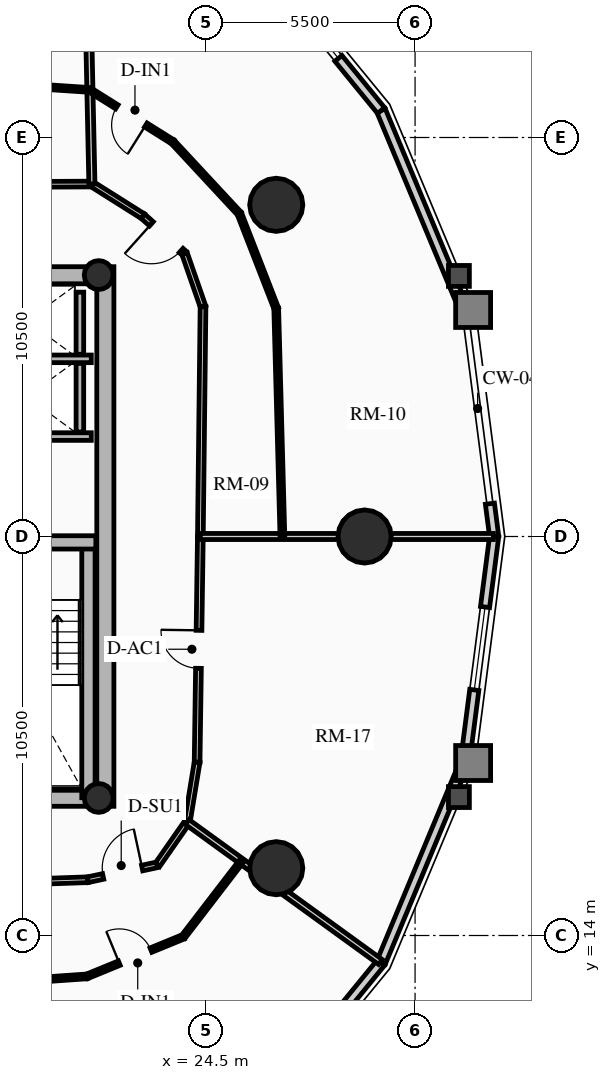
"""IFC4 building model, lengths in metres.
Left out: names, types, materials, properties, quantities, classifications, styles, units other than length and angle.
Written with IfcOpenShell. Run it as: python <this file> out.ifc"""

import sys

from ifc_helpers import new_model, si_unit, direction, frame, frame_2d, origin, origin_2d, place, context, subcontext, project, spatial, rectangle, circle, hollow_circle, extrude, source, transform, mapped, element, fill, save


model = new_model("IFC4")
c1 = context("Model", 3, precision=1e-05, world=origin(), true_north=direction((0.0, 1.0)))
c2 = subcontext(c1, "Body", "Model", "MODEL_VIEW")
j1 = project(units=[si_unit("LENGTHUNIT", "METRE"), si_unit("PLANEANGLEUNIT", "RADIAN")], contexts=[c1])
p1 = place(None, origin())
s1 = spatial("IfcSite", under=j1, at=p1, CompositionType="ELEMENT")
p2 = place(p1, origin())
s2 = spatial("IfcBuilding", under=s1, at=p2, CompositionType="ELEMENT")
p3 = place(p2, frame((0.0, 0.0, 93.43)))
s3 = spatial("IfcBuildingStorey", under=s2, at=p3, CompositionType="ELEMENT", Elevation=93.43)
p4 = place(p3, frame((21.85, 17.4, 0.0), z_axis=(0.0, 0.0, 1.0), x_axis=(0.0, 1.0, 0.0)))
e1 = element("IfcWall", 1, at=p4, inside=s3, PredefinedType="SHEAR", context=c2, shape_type="SweptSolid", body=[
    extrude(rectangle(XDim=14.2, YDim=0.45, at=frame_2d((7.1, 0.0))), origin(), (0.0, 0.0, 1.0), 2.91),
])
p5 = place(p3, frame((11.15, 17.625, 0.0), z_axis=(0.0, 0.0, 1.0), x_axis=(1.0, 0.0, 0.0)))
e2 = element("IfcWall", 2, at=p5, inside=s3, PredefinedType="SHEAR", context=c2, shape_type="SweptSolid", body=[
    extrude(rectangle(XDim=10.7, YDim=0.45, at=frame_2d((5.35, 0.0))), origin(), (0.0, 0.0, 1.0), 2.91),
])
m1 = source(origin(), c2, "Body", "SweptSolid", [
    extrude(rectangle(XDim=1.5, YDim=2.02, at=frame_2d((0.75, 1.01))), frame((0.0, 0.235, 0.0), z_axis=(0.0, -1.0, 0.0), x_axis=(1.0, 0.0, 0.0)), (0.0, 0.0, 1.0), 0.47),
])
p6 = place(p5, frame((5.45, 0.0, 0.0)))
e3 = element("IfcOpeningElement", 3, at=p6, cuts=e2, PredefinedType="OPENING", context=c2, shape_type="MappedRepresentation", body=[
    mapped(m1, transform((0.0, 0.0, 0.0), x_axis=(1.0, 0.0, 0.0), y_axis=(0.0, 1.0, 0.0), z_axis=(0.0, 0.0, 1.0), scale=1.0)),
])
p7 = place(p3, frame((11.15, 31.375, 0.0), z_axis=(0.0, 0.0, 1.0), x_axis=(1.0, 0.0, 0.0)))
e4 = element("IfcWall", 4, at=p7, inside=s3, PredefinedType="SHEAR", context=c2, shape_type="SweptSolid", body=[
    extrude(rectangle(XDim=10.7, YDim=0.45, at=frame_2d((5.35, 0.0))), origin(), (0.0, 0.0, 1.0), 2.91),
])
p8 = place(p7, frame((4.6, 0.0, 0.0)))
e5 = element("IfcOpeningElement", 5, at=p8, cuts=e4, PredefinedType="OPENING", context=c2, shape_type="MappedRepresentation", body=[
    mapped(m1, transform((0.0, 0.0, 0.0), x_axis=(1.0, 0.0, 0.0), y_axis=(0.0, 1.0, 0.0), z_axis=(0.0, 0.0, 1.0), scale=1.0)),
])
p9 = place(p3, frame((21.405, 17.625, 0.0), z_axis=(0.0, 0.0, 1.0), x_axis=(0.0, 1.0, 0.0)))
e6 = element("IfcWall", 6, at=p9, inside=s3, PredefinedType="SHEAR", context=c2, shape_type="SweptSolid", body=[
    extrude(rectangle(XDim=6.72, YDim=0.35, at=frame_2d((3.36, 0.0))), origin(), (0.0, 0.0, 1.0), 2.91),
])
p10 = place(p3, frame((18.315, 24.345, 0.0), z_axis=(0.0, 0.0, 1.0), x_axis=(1.0, 0.0, 0.0)))
e7 = element("IfcWall", 7, at=p10, inside=s3, PredefinedType="SHEAR", context=c2, shape_type="SweptSolid", body=[
    extrude(rectangle(XDim=3.285, YDim=0.35, at=frame_2d((1.643, 0.0))), origin(), (0.0, 0.0, 1.0), 2.91),
])
for number, where, z_axis, x_axis in (
    (8, (21.675, 17.62, 0.0), (0.0, 0.0, 1.0), (1.0, 0.0, 0.0)),
    (9, (21.675, 31.38, 0.0), (0.0, 0.0, 1.0), (1.0, 0.0, 0.0)),
):
    element("IfcColumn", number, at=place(p3, frame(where, z_axis=z_axis, x_axis=x_axis)), inside=s3, PredefinedType="COLUMN", context=c2, shape_type="SweptSolid", body=[
        extrude(hollow_circle(Radius=0.38, WallThickness=0.032, at=origin_2d()), origin(), (0.0, 0.0, 1.0), 2.91),
    ])
for number, where, z_axis, x_axis in (
    (10, (28.672, 24.5, 0.0), (0.0, 0.0, 1.0), (1.0, 0.0, 0.0)),
    (11, (26.347, 33.229, 0.0), (0.0, 0.0, 1.0), (1.0, 0.0, 0.0)),
    (12, (26.347, 15.771, 0.0), (0.0, 0.0, 1.0), (1.0, 0.0, 0.0)),
):
    element("IfcColumn", number, at=place(p3, frame(where, z_axis=z_axis, x_axis=x_axis)), inside=s3, PredefinedType="USERDEFINED", context=c2, shape_type="SweptSolid", body=[
        extrude(circle(Radius=0.7, at=origin_2d()), origin(), (0.0, 0.0, 1.0), 2.91),
    ])
p11 = place(p3, frame((31.969, 25.363, 0.0), z_axis=(0.0, 0.0, 1.0), x_axis=(0.128523364007, -0.991706481225, 0.0)))
e13 = element("IfcWall", 13, at=p11, inside=s3, PredefinedType="SOLIDWALL", context=c2, shape_type="SweptSolid", body=[
    extrude(rectangle(XDim=0.87, YDim=0.24, at=frame_2d((0.435, 0.0))), origin(), (0.0, 0.0, 1.0), 2.655),
])
p12 = place(p3, frame((29.105, 35.709, 0.0), z_axis=(0.0, 0.0, 1.0), x_axis=(0.384344417632, -0.923189779317, 0.0)))
e14 = element("IfcWall", 14, at=p12, inside=s3, PredefinedType="SOLIDWALL", context=c2, shape_type="SweptSolid", body=[
    extrude(rectangle(XDim=5.758, YDim=0.24, at=frame_2d((2.879, 0.0))), origin(), (0.0, 0.0, 1.0), 2.179),
])
p13 = place(p3, frame((25.658, 39.928, 0.0), z_axis=(0.0, 0.0, 1.0), x_axis=(0.632700781152, -0.77439635945, 0.0)))
e15 = element("IfcWall", 15, at=p13, inside=s3, PredefinedType="SOLIDWALL", context=c2, shape_type="SweptSolid", body=[
    extrude(rectangle(XDim=5.448, YDim=0.24, at=frame_2d((2.724, 0.0))), origin(), (0.0, 0.0, 1.0), 2.179),
])
m2 = source(origin(), c2, "Body", "SweptSolid", [
    extrude(rectangle(XDim=1.9, YDim=1.35, at=frame_2d((0.95, 0.675))), frame((0.0, 0.13, 0.0), z_axis=(0.0, -1.0, 0.0), x_axis=(1.0, 0.0, 0.0)), (0.0, 0.0, 1.0), 0.26),
])
p14 = place(p13, frame((1.774, 0.0, 0.65)))
e16 = element("IfcOpeningElement", 16, at=p14, cuts=e15, PredefinedType="OPENING", context=c2, shape_type="MappedRepresentation", body=[
    mapped(m2, transform((0.0, 0.0, 0.0), x_axis=(1.0, 0.0, 0.0), y_axis=(0.0, 1.0, 0.0), z_axis=(0.0, 0.0, 1.0), scale=1.0)),
])
p15 = place(p3, frame((29.105, 13.291, 0.0), z_axis=(0.0, 0.0, 1.0), x_axis=(-0.632700781152, -0.77439635945, 0.0)))
e17 = element("IfcWall", 17, at=p15, inside=s3, PredefinedType="SOLIDWALL", context=c2, shape_type="SweptSolid", body=[
    extrude(rectangle(XDim=5.448, YDim=0.24, at=frame_2d((2.724, 0.0))), origin(), (0.0, 0.0, 1.0), 2.179),
])
p16 = place(p15, frame((1.774, 0.0, 0.65)))
e18 = element("IfcOpeningElement", 18, at=p16, cuts=e17, PredefinedType="OPENING", context=c2, shape_type="MappedRepresentation", body=[
    mapped(m2, transform((0.0, 0.0, 0.0), x_axis=(1.0, 0.0, 0.0), y_axis=(0.0, 1.0, 0.0), z_axis=(0.0, 0.0, 1.0), scale=1.0)),
])
p17 = place(p3, frame((31.318, 18.607, 0.0), z_axis=(0.0, 0.0, 1.0), x_axis=(-0.384344417632, -0.923189779317, 0.0)))
e19 = element("IfcWall", 19, at=p17, inside=s3, PredefinedType="SOLIDWALL", context=c2, shape_type="SweptSolid", body=[
    extrude(rectangle(XDim=5.758, YDim=0.24, at=frame_2d((2.879, 0.0))), origin(), (0.0, 0.0, 1.0), 2.179),
])
p18 = place(p3, frame((32.081, 24.5, 0.0), z_axis=(0.0, 0.0, 1.0), x_axis=(-0.128351991996, -0.991728675672, 0.0)))
e20 = element("IfcWall", 20, at=p18, inside=s3, PredefinedType="SOLIDWALL", context=c2, shape_type="SweptSolid", body=[
    extrude(rectangle(XDim=5.942, YDim=0.24, at=frame_2d((2.971, 0.0))), origin(), (0.0, 0.0, 1.0), 2.179),
])
m3 = source(origin(), c2, "Body", "SweptSolid", [
    extrude(rectangle(XDim=2.2, YDim=1.35, at=frame_2d((1.1, 0.675))), frame((0.0, 0.13, 0.0), z_axis=(0.0, -1.0, 0.0), x_axis=(1.0, 0.0, 0.0)), (0.0, 0.0, 1.0), 0.26),
])
p19 = place(p18, frame((1.871, 0.0, 0.65)))
e21 = element("IfcOpeningElement", 21, at=p19, cuts=e20, PredefinedType="OPENING", context=c2, shape_type="MappedRepresentation", body=[
    mapped(m3, transform((0.0, 0.0, 0.0), x_axis=(1.0, 0.0, 0.0), y_axis=(0.0, 1.0, 0.0), z_axis=(0.0, 0.0, 1.0), scale=1.0)),
])
for number, where, z_axis, x_axis in (
    (22, (18.51, 27.13, 0.0), (0.0, 0.0, 1.0), (1.0, 0.0, 0.0)),
    (23, (18.51, 29.175, 0.0), (0.0, 0.0, 1.0), (1.0, 0.0, 0.0)),
):
    element("IfcWall", number, at=place(p3, frame(where, z_axis=z_axis, x_axis=x_axis)), inside=s3, PredefinedType="SHEAR", context=c2, shape_type="SweptSolid", body=[
        extrude(rectangle(XDim=2.97, YDim=0.2, at=frame_2d((1.485, 0.0))), origin(), (0.0, 0.0, 1.0), 2.91),
    ])
p20 = place(p3, frame((21.18, 27.25, 0.0), z_axis=(0.0, 0.0, 1.0), x_axis=(0.0, 1.0, 0.0)))
e24 = element("IfcWall", 24, at=p20, inside=s3, PredefinedType="SHEAR", context=c2, shape_type="SweptSolid", body=[
    extrude(rectangle(XDim=1.805, YDim=0.2, at=frame_2d((0.902, 0.0))), origin(), (0.0, 0.0, 1.0), 2.91),
])
p21 = place(p3, frame((21.18, 29.295, 0.0), z_axis=(0.0, 0.0, 1.0), x_axis=(0.0, 1.0, 0.0)))
e25 = element("IfcWall", 25, at=p21, inside=s3, PredefinedType="SHEAR", context=c2, shape_type="SweptSolid", body=[
    extrude(rectangle(XDim=1.635, YDim=0.2, at=frame_2d((0.817, 0.0))), origin(), (0.0, 0.0, 1.0), 2.91),
])
p22 = place(p3, frame((24.35, 24.5, 0.0), z_axis=(0.0, 0.0, 1.0), x_axis=(0.011582078845, 0.999932925475, 0.0)))
e26 = element("IfcWall", 26, at=p22, inside=s3, PredefinedType="PARTITIONING", context=c2, shape_type="SweptSolid", body=[
    extrude(rectangle(XDim=6.05, YDim=0.15, at=frame_2d((3.025, 0.0))), origin(), (0.0, 0.0, 1.0), 2.225),
])
p23 = place(p3, frame((24.42, 30.549, 0.0), z_axis=(0.0, 0.0, 1.0), x_axis=(-0.329071042252, 0.944305167386, 0.0)))
e27 = element("IfcWall", 27, at=p23, inside=s3, PredefinedType="PARTITIONING", context=c2, shape_type="SweptSolid", body=[
    extrude(rectangle(XDim=1.479, YDim=0.15, at=frame_2d((0.74, 0.0))), origin(), (0.0, 0.0, 1.0), 2.225),
])
p24 = place(p3, frame((23.933, 31.946, 0.0), z_axis=(0.0, 0.0, 1.0), x_axis=(-0.744529651383, 0.667589393423, 0.0)))
e28 = element("IfcWall", 28, at=p24, inside=s3, PredefinedType="PARTITIONING", context=c2, shape_type="SweptSolid", body=[
    extrude(rectangle(XDim=1.472, YDim=0.15, at=frame_2d((0.736, 0.0))), origin(), (0.0, 0.0, 1.0), 2.225),
])
m4 = source(origin(), c2, "Body", "SweptSolid", [
    extrude(rectangle(XDim=1.05, YDim=2.015, at=frame_2d((0.525, 1.007))), frame((0.0, 0.085, 0.0), z_axis=(0.0, -1.0, 0.0), x_axis=(1.0, 0.0, 0.0)), (0.0, 0.0, 1.0), 0.17),
])
p25 = place(p24, frame((0.12, 0.0, 0.0)))
e29 = element("IfcOpeningElement", 29, at=p25, cuts=e28, PredefinedType="OPENING", context=c2, shape_type="MappedRepresentation", body=[
    mapped(m4, transform((0.0, 0.0, 0.0), x_axis=(1.0, 0.0, 0.0), y_axis=(0.0, 1.0, 0.0), z_axis=(0.0, 0.0, 1.0), scale=1.0)),
])
p26 = place(p3, frame((22.837, 32.929, 0.0), z_axis=(0.0, 0.0, 1.0), x_axis=(-0.84581079329, 0.533482991252, 0.0)))
e30 = element("IfcWall", 30, at=p26, inside=s3, PredefinedType="PARTITIONING", context=c2, shape_type="SweptSolid", body=[
    extrude(rectangle(XDim=1.585, YDim=0.15, at=frame_2d((0.792, 0.0))), origin(), (0.0, 0.0, 1.0), 2.225),
])
p27 = place(p3, frame((21.496, 33.775, 0.0), z_axis=(0.0, 0.0, 1.0), x_axis=(-0.999989544737, -0.004572790979, 0.0)))
e31 = element("IfcWall", 31, at=p27, inside=s3, PredefinedType="PARTITIONING", context=c2, shape_type="SweptSolid", body=[
    extrude(rectangle(XDim=3.364, YDim=0.15, at=frame_2d((1.682, 0.0))), origin(), (0.0, 0.0, 1.0), 2.225),
])
p28 = place(p3, frame((14.792, 15.24, 0.0), z_axis=(0.0, 0.0, 1.0), x_axis=(0.999408106202, 0.034401122909, 0.0)))
e32 = element("IfcWall", 32, at=p28, inside=s3, PredefinedType="PARTITIONING", context=c2, shape_type="SweptSolid", body=[
    extrude(rectangle(XDim=6.6, YDim=0.15, at=frame_2d((3.3, 0.0))), origin(), (0.0, 0.0, 1.0), 2.225),
])
p29 = place(p3, frame((21.388, 15.468, 0.0), z_axis=(0.0, 0.0, 1.0), x_axis=(0.977672748596, 0.210133283069, 0.0)))
e33 = element("IfcWall", 33, at=p29, inside=s3, PredefinedType="PARTITIONING", context=c2, shape_type="SweptSolid", body=[
    extrude(rectangle(XDim=1.876, YDim=0.15, at=frame_2d((0.938, 0.0))), origin(), (0.0, 0.0, 1.0), 2.225),
])
p30 = place(p29, frame((0.413, 0.0, 0.0)))
e34 = element("IfcOpeningElement", 34, at=p30, cuts=e33, PredefinedType="OPENING", context=c2, shape_type="MappedRepresentation", body=[
    mapped(m4, transform((0.0, 0.0, 0.0), x_axis=(1.0, 0.0, 0.0), y_axis=(0.0, 1.0, 0.0), z_axis=(0.0, 0.0, 1.0), scale=1.0)),
])
p31 = place(p3, frame((23.222, 15.862, 0.0), z_axis=(0.0, 0.0, 1.0), x_axis=(0.571941738195, 0.820294244836, 0.0)))
e35 = element("IfcWall", 35, at=p31, inside=s3, PredefinedType="PARTITIONING", context=c2, shape_type="SweptSolid", body=[
    extrude(rectangle(XDim=1.369, YDim=0.15, at=frame_2d((0.685, 0.0))), origin(), (0.0, 0.0, 1.0), 2.225),
])
p32 = place(p3, frame((24.006, 16.985, 0.0), z_axis=(0.0, 0.0, 1.0), x_axis=(0.162043475877, 0.986783619608, 0.0)))
e36 = element("IfcWall", 36, at=p32, inside=s3, PredefinedType="PARTITIONING", context=c2, shape_type="SweptSolid", body=[
    extrude(rectangle(XDim=1.597, YDim=0.15, at=frame_2d((0.798, 0.0))), origin(), (0.0, 0.0, 1.0), 2.225),
])
p33 = place(p3, frame((24.264, 18.561, 0.0), z_axis=(0.0, 0.0, 1.0), x_axis=(0.014427504204, 0.999895918145, 0.0)))
e37 = element("IfcWall", 37, at=p33, inside=s3, PredefinedType="PARTITIONING", context=c2, shape_type="SweptSolid", body=[
    extrude(rectangle(XDim=5.94, YDim=0.15, at=frame_2d((2.97, 0.0))), origin(), (0.0, 0.0, 1.0), 2.655),
])
m5 = source(origin(), c2, "Body", "SweptSolid", [
    extrude(rectangle(XDim=1.0, YDim=2.015, at=frame_2d((0.5, 1.007))), frame((0.0, 0.085, 0.0), z_axis=(0.0, -1.0, 0.0), x_axis=(1.0, 0.0, 0.0)), (0.0, 0.0, 1.0), 0.17),
])
p34 = place(p33, frame((2.47, 0.0, 0.0)))
e38 = element("IfcOpeningElement", 38, at=p34, cuts=e37, PredefinedType="OPENING", context=c2, shape_type="MappedRepresentation", body=[
    mapped(m5, transform((0.0, 0.0, 0.0), x_axis=(1.0, 0.0, 0.0), y_axis=(0.0, 1.0, 0.0), z_axis=(0.0, 0.0, 1.0), scale=1.0)),
])
p35 = place(p3, frame((24.35, 24.5, 0.0), z_axis=(0.0, 0.0, 1.0), x_axis=(1.0, 0.0, 0.0)))
e39 = element("IfcWall", 39, at=p35, inside=s3, PredefinedType="PARTITIONING", context=c2, shape_type="SweptSolid", body=[
    extrude(rectangle(XDim=7.711, YDim=0.16, at=frame_2d((3.855, 0.0))), origin(), (0.0, 0.0, 1.0), 2.179),
])
p36 = place(p3, frame((21.496, 33.775, 0.0), z_axis=(0.0, 0.0, 1.0), x_axis=(-0.021226580265, 0.999774690763, 0.0)))
e40 = element("IfcWall", 40, at=p36, inside=s3, PredefinedType="PARTITIONING", context=c2, shape_type="SweptSolid", body=[
    extrude(rectangle(XDim=8.845, YDim=0.16, at=frame_2d((4.422, 0.0))), origin(), (0.0, 0.0, 1.0), 2.179),
])
p37 = place(p3, frame((24.006, 16.985, 0.0), z_axis=(0.0, 0.0, 1.0), x_axis=(0.809849730791, -0.586637378231, 0.0)))
e41 = element("IfcWall", 41, at=p37, inside=s3, PredefinedType="PARTITIONING", context=c2, shape_type="SweptSolid", body=[
    extrude(rectangle(XDim=6.277, YDim=0.16, at=frame_2d((3.139, 0.0))), origin(), (0.0, 0.0, 1.0), 2.179),
])
p38 = place(p3, frame((26.509, 24.5, 0.0), z_axis=(0.0, 0.0, 1.0), x_axis=(-0.027112670792, 0.99963238397, 0.0)))
e42 = element("IfcWall", 42, at=p38, inside=s3, PredefinedType="PARTITIONING", context=c2, shape_type="SweptSolid", body=[
    extrude(rectangle(XDim=6.006, YDim=0.125, at=frame_2d((3.003, 0.0))), origin(), (0.0, 0.0, 1.0), 2.225),
])
p39 = place(p3, frame((26.346, 30.504, 0.0), z_axis=(0.0, 0.0, 1.0), x_axis=(-0.362402208915, 0.932021801769, 0.0)))
e43 = element("IfcWall", 43, at=p39, inside=s3, PredefinedType="PARTITIONING", context=c2, shape_type="SweptSolid", body=[
    extrude(rectangle(XDim=2.675, YDim=0.125, at=frame_2d((1.337, 0.0))), origin(), (0.0, 0.0, 1.0), 2.225),
])
p40 = place(p3, frame((25.377, 32.997, 0.0), z_axis=(0.0, 0.0, 1.0), x_axis=(-0.680516524321, 0.732732734445, 0.0)))
e44 = element("IfcWall", 44, at=p40, inside=s3, PredefinedType="PARTITIONING", context=c2, shape_type="SweptSolid", body=[
    extrude(rectangle(XDim=2.576, YDim=0.125, at=frame_2d((1.288, 0.0))), origin(), (0.0, 0.0, 1.0), 2.655),
])
p41 = place(p3, frame((23.624, 34.884, 0.0), z_axis=(0.0, 0.0, 1.0), x_axis=(-0.84728326465, 0.531141289531, 0.0)))
e45 = element("IfcWall", 45, at=p41, inside=s3, PredefinedType="PARTITIONING", context=c2, shape_type="SweptSolid", body=[
    extrude(rectangle(XDim=2.573, YDim=0.125, at=frame_2d((1.287, 0.0))), origin(), (0.0, 0.0, 1.0), 2.225),
])
m6 = source(origin(), c2, "Body", "SweptSolid", [
    extrude(rectangle(XDim=0.9, YDim=2.005, at=frame_2d((0.45, 1.002))), frame((0.0, 0.073, 0.0), z_axis=(0.0, -1.0, 0.0), x_axis=(1.0, 0.0, 0.0)), (0.0, 0.0, 1.0), 0.145),
])
p42 = place(p41, frame((0.836, 0.0, 0.0)))
e46 = element("IfcOpeningElement", 46, at=p42, cuts=e45, PredefinedType="OPENING", context=c2, shape_type="MappedRepresentation", body=[
    mapped(m6, transform((0.0, 0.0, 0.0), x_axis=(1.0, 0.0, 0.0), y_axis=(0.0, 1.0, 0.0), z_axis=(0.0, 0.0, 1.0), scale=1.0)),
])
p43 = place(p3, frame((21.444, 36.251, 0.0), z_axis=(0.0, 0.0, 1.0), x_axis=(-0.997810544349, 0.066137112017, 0.0)))
e47 = element("IfcWall", 47, at=p43, inside=s3, PredefinedType="PARTITIONING", context=c2, shape_type="SweptSolid", body=[
    extrude(rectangle(XDim=3.776, YDim=0.125, at=frame_2d((1.888, 0.0))), origin(), (0.0, 0.0, 1.0), 2.225),
])
p44 = place(p3, frame((15.27, 12.499, 0.0), z_axis=(0.0, 0.0, 1.0), x_axis=(0.997586055533, 0.069441067147, 0.0)))
e48 = element("IfcWall", 48, at=p44, inside=s3, PredefinedType="PARTITIONING", context=c2, shape_type="SweptSolid", body=[
    extrude(rectangle(XDim=6.11, YDim=0.125, at=frame_2d((3.055, 0.0))), origin(), (0.0, 0.0, 1.0), 2.225),
])
p45 = place(p3, frame((21.366, 12.924, 0.0), z_axis=(0.0, 0.0, 1.0), x_axis=(0.924996898971, 0.379974652962, 0.0)))
e49 = element("IfcWall", 49, at=p45, inside=s3, PredefinedType="PARTITIONING", context=c2, shape_type="SweptSolid", body=[
    extrude(rectangle(XDim=2.741, YDim=0.125, at=frame_2d((1.371, 0.0))), origin(), (0.0, 0.0, 1.0), 2.225),
])
p46 = place(p45, frame((0.92, 0.0, 0.0)))
e50 = element("IfcOpeningElement", 50, at=p46, cuts=e49, PredefinedType="OPENING", context=c2, shape_type="MappedRepresentation", body=[
    mapped(m6, transform((0.0, 0.0, 0.0), x_axis=(1.0, 0.0, 0.0), y_axis=(0.0, 1.0, 0.0), z_axis=(0.0, 0.0, 1.0), scale=1.0)),
])
p47 = place(p3, frame((23.901, 13.965, 0.0), z_axis=(0.0, 0.0, 1.0), x_axis=(0.609164923344, 0.793043565113, 0.0)))
e51 = element("IfcWall", 51, at=p47, inside=s3, PredefinedType="PARTITIONING", context=c2, shape_type="SweptSolid", body=[
    extrude(rectangle(XDim=2.508, YDim=0.125, at=frame_2d((1.254, 0.0))), origin(), (0.0, 0.0, 1.0), 2.655),
])
m7 = source(origin(), c2, "Body", "SweptSolid", [
    extrude(rectangle(XDim=1.9, YDim=1.35, at=frame_2d((0.95, 0.675))), frame((0.0, 0.03, 0.0), z_axis=(0.0, -1.0, 0.0), x_axis=(1.0, 0.0, 0.0)), (0.0, 0.0, 1.0), 0.06),
])
p48 = place(p14, origin())
e52 = element("IfcWindow", 52, at=p48, inside=s3, PartitioningType="DOUBLE_PANEL_VERTICAL", PredefinedType="WINDOW", context=c2, shape_type="MappedRepresentation", body=[
    mapped(m7, transform((0.0, 0.0, 0.0), x_axis=(1.0, 0.0, 0.0), y_axis=(0.0, 1.0, 0.0), z_axis=(0.0, 0.0, 1.0), scale=1.0)),
])
fill(e16, e52)
m8 = source(origin(), c2, "Body", "SweptSolid", [
    extrude(rectangle(XDim=2.2, YDim=1.35, at=frame_2d((1.1, 0.675))), frame((0.0, 0.03, 0.0), z_axis=(0.0, -1.0, 0.0), x_axis=(1.0, 0.0, 0.0)), (0.0, 0.0, 1.0), 0.06),
])
p49 = place(p19, origin())
e53 = element("IfcWindow", 53, at=p49, inside=s3, PartitioningType="DOUBLE_PANEL_VERTICAL", PredefinedType="WINDOW", context=c2, shape_type="MappedRepresentation", body=[
    mapped(m8, transform((0.0, 0.0, 0.0), x_axis=(1.0, 0.0, 0.0), y_axis=(0.0, 1.0, 0.0), z_axis=(0.0, 0.0, 1.0), scale=1.0)),
])
fill(e21, e53)
m9 = source(origin(), c2, "Body", "SweptSolid", [
    extrude(rectangle(XDim=1.05, YDim=2.015, at=frame_2d((0.525, 1.007))), frame((0.0, 0.025, 0.0), z_axis=(0.0, -1.0, 0.0), x_axis=(1.0, 0.0, 0.0)), (0.0, 0.0, 1.0), 0.05),
])
p50 = place(p25, origin())
e54 = element("IfcDoor", 54, at=p50, inside=s3, OperationType="SINGLE_SWING_RIGHT", PredefinedType="DOOR", context=c2, shape_type="MappedRepresentation", body=[
    mapped(m9, transform((0.0, 0.0, 0.0), x_axis=(1.0, 0.0, 0.0), y_axis=(0.0, 1.0, 0.0), z_axis=(0.0, 0.0, 1.0), scale=1.0)),
])
fill(e29, e54)
m10 = source(origin(), c2, "Body", "SweptSolid", [
    extrude(rectangle(XDim=0.9, YDim=2.005, at=frame_2d((0.45, 1.002))), frame((0.0, 0.025, 0.0), z_axis=(0.0, -1.0, 0.0), x_axis=(1.0, 0.0, 0.0)), (0.0, 0.0, 1.0), 0.05),
])
p51 = place(p42, origin())
e55 = element("IfcDoor", 55, at=p51, inside=s3, OperationType="SINGLE_SWING_LEFT", PredefinedType="DOOR", context=c2, shape_type="MappedRepresentation", body=[
    mapped(m10, transform((0.0, 0.0, 0.0), x_axis=(1.0, 0.0, 0.0), y_axis=(0.0, 1.0, 0.0), z_axis=(0.0, 0.0, 1.0), scale=1.0)),
])
fill(e46, e55)
p52 = place(p30, origin())
e56 = element("IfcDoor", 56, at=p52, inside=s3, OperationType="SINGLE_SWING_RIGHT", PredefinedType="DOOR", context=c2, shape_type="MappedRepresentation", body=[
    mapped(m9, transform((0.0, 0.0, 0.0), x_axis=(1.0, 0.0, 0.0), y_axis=(0.0, 1.0, 0.0), z_axis=(0.0, 0.0, 1.0), scale=1.0)),
])
fill(e34, e56)
p53 = place(p46, origin())
e57 = element("IfcDoor", 57, at=p53, inside=s3, OperationType="SINGLE_SWING_LEFT", PredefinedType="DOOR", context=c2, shape_type="MappedRepresentation", body=[
    mapped(m10, transform((0.0, 0.0, 0.0), x_axis=(1.0, 0.0, 0.0), y_axis=(0.0, 1.0, 0.0), z_axis=(0.0, 0.0, 1.0), scale=1.0)),
])
fill(e50, e57)
m11 = source(origin(), c2, "Body", "SweptSolid", [
    extrude(rectangle(XDim=1.0, YDim=2.015, at=frame_2d((0.5, 1.007))), frame((0.0, 0.025, 0.0), z_axis=(0.0, -1.0, 0.0), x_axis=(1.0, 0.0, 0.0)), (0.0, 0.0, 1.0), 0.05),
])
p54 = place(p34, origin())
e58 = element("IfcDoor", 58, at=p54, inside=s3, OperationType="SINGLE_SWING_RIGHT", PredefinedType="DOOR", context=c2, shape_type="MappedRepresentation", body=[
    mapped(m11, transform((0.0, 0.0, 0.0), x_axis=(1.0, 0.0, 0.0), y_axis=(0.0, 1.0, 0.0), z_axis=(0.0, 0.0, 1.0), scale=1.0)),
])
fill(e38, e58)
save(model, sys.argv[1])
